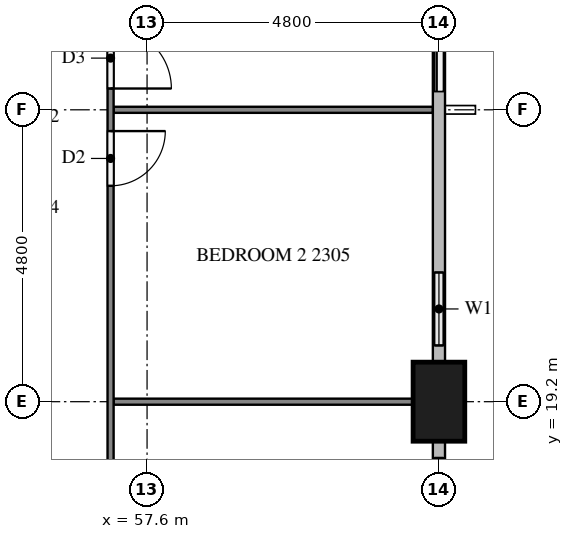
"""IFC4 building model, lengths in metres.
Left out: names, types, materials, properties, quantities, classifications, styles, units other than length and angle.
Written with IfcOpenShell. Run it as: python <this file> out.ifc"""

import sys

from ifc_helpers import new_model, si_unit, direction, frame, frame_2d, origin, origin_2d, place, context, subcontext, project, spatial, rectangle, extrude, element, fill, save


model = new_model("IFC4")
c1 = context("Model", 3, precision=1e-05, world=origin(), true_north=direction((0.0, 1.0)))
c2 = subcontext(c1, "Body", "Model", "MODEL_VIEW")
j1 = project(units=[si_unit("LENGTHUNIT", "METRE"), si_unit("PLANEANGLEUNIT", "RADIAN")], contexts=[c1])
p1 = place(None, origin())
s1 = spatial("IfcSite", under=j1, at=p1, CompositionType="ELEMENT")
p2 = place(p1, origin())
s2 = spatial("IfcBuilding", under=s1, at=p2, CompositionType="ELEMENT")
p3 = place(p2, frame((0.0, 0.0, 92.7)))
s3 = spatial("IfcBuildingStorey", under=s2, at=p3, CompositionType="ELEMENT", Elevation=92.7)
p4 = place(p3, frame((62.4, 19.2, 0.0), z_axis=(0.0, 0.0, 1.0), x_axis=(0.0, 1.0, 0.0)))
e1 = element("IfcColumn", 1, at=p4, inside=s3, PredefinedType="COLUMN", context=c2, shape_type="SweptSolid", body=[
    extrude(rectangle(XDim=1.3, YDim=0.85, at=origin_2d()), origin(), (0.0, 0.0, 1.0), 3.2),
])
p5 = place(p3, frame((62.4, 16.8, 0.0), z_axis=(0.0, 0.0, 1.0), x_axis=(0.0, 1.0, 0.0)))
e2 = element("IfcWall", 2, at=p5, inside=s3, PredefinedType="SOLIDWALL", context=c2, shape_type="SweptSolid", body=[
    extrude(rectangle(XDim=1.75, YDim=0.15, at=frame_2d((0.875, 0.0))), origin(), (0.0, 0.0, 1.0), 3.2),
])
p6 = place(p5, frame((0.275, 0.0, 0.9)))
e3 = element("IfcOpeningElement", 3, at=p6, cuts=e2, PredefinedType="OPENING", context=c2, shape_type="SweptSolid", body=[
    extrude(rectangle(XDim=1.2, YDim=1.4, at=frame_2d((0.6, 0.7))), frame((0.0, 0.085, 0.0), z_axis=(0.0, -1.0, 0.0), x_axis=(1.0, 0.0, 0.0)), (0.0, 0.0, 1.0), 0.17),
])
p7 = place(p3, frame((62.4, 19.85, 0.0), z_axis=(0.0, 0.0, 1.0), x_axis=(0.0, 1.0, 0.0)))
e4 = element("IfcWall", 4, at=p7, inside=s3, PredefinedType="SOLIDWALL", context=c2, shape_type="SweptSolid", body=[
    extrude(rectangle(XDim=1.75, YDim=0.15, at=frame_2d((0.875, 0.0))), origin(), (0.0, 0.0, 1.0), 3.2),
])
p8 = place(p7, frame((0.275, 0.0, 0.9)))
e5 = element("IfcOpeningElement", 5, at=p8, cuts=e4, PredefinedType="OPENING", context=c2, shape_type="SweptSolid", body=[
    extrude(rectangle(XDim=1.2, YDim=1.4, at=frame_2d((0.6, 0.7))), frame((0.0, 0.085, 0.0), z_axis=(0.0, -1.0, 0.0), x_axis=(1.0, 0.0, 0.0)), (0.0, 0.0, 1.0), 0.17),
])
p9 = place(p3, frame((62.4, 24.0, 0.0), z_axis=(0.0, 0.0, 1.0), x_axis=(0.0, 1.0, 0.0)))
e6 = element("IfcWall", 6, at=p9, inside=s3, PredefinedType="SOLIDWALL", context=c2, shape_type="SweptSolid", body=[
    extrude(rectangle(XDim=2.4, YDim=0.15, at=frame_2d((1.2, 0.0))), origin(), (0.0, 0.0, 1.0), 3.2),
])
p10 = place(p9, frame((0.3, 0.0, 0.0)))
e7 = element("IfcOpeningElement", 7, at=p10, cuts=e6, PredefinedType="OPENING", context=c2, shape_type="SweptSolid", body=[
    extrude(rectangle(XDim=1.8, YDim=2.4, at=frame_2d((0.9, 1.2))), frame((0.0, 0.085, 0.0), z_axis=(0.0, -1.0, 0.0), x_axis=(1.0, 0.0, 0.0)), (0.0, 0.0, 1.0), 0.17),
])
p11 = place(p3, frame((57.05, 19.2, 0.0), z_axis=(0.0, 0.0, 1.0), x_axis=(1.0, 0.0, 0.0)))
e8 = element("IfcWall", 8, at=p11, inside=s3, PredefinedType="PARTITIONING", context=c2, shape_type="SweptSolid", body=[
    extrude(rectangle(XDim=4.925, YDim=0.1, at=frame_2d((2.462, 0.0))), origin(), (0.0, 0.0, 1.0), 3.2),
])
p12 = place(p3, frame((57.05, 24.0, 0.0), z_axis=(0.0, 0.0, 1.0), x_axis=(1.0, 0.0, 0.0)))
e9 = element("IfcWall", 9, at=p12, inside=s3, PredefinedType="PARTITIONING", context=c2, shape_type="SweptSolid", body=[
    extrude(rectangle(XDim=5.25, YDim=0.1, at=frame_2d((2.625, 0.0))), origin(), (0.0, 0.0, 1.0), 3.2),
])
p13 = place(p3, frame((57.0, 28.7, 0.0), z_axis=(0.0, 0.0, 1.0), x_axis=(0.0, -1.0, 0.0)))
e10 = element("IfcWall", 10, at=p13, inside=s3, PredefinedType="PARTITIONING", context=c2, shape_type="SweptSolid", body=[
    extrude(rectangle(XDim=13.6, YDim=0.1, at=frame_2d((6.8, 0.0))), origin(), (0.0, 0.0, 1.0), 3.2),
])
p14 = place(p13, frame((12.4, 0.0, 0.0)))
e11 = element("IfcOpeningElement", 11, at=p14, cuts=e10, PredefinedType="OPENING", context=c2, shape_type="SweptSolid", body=[
    extrude(rectangle(XDim=0.9, YDim=2.1, at=frame_2d((0.45, 1.05))), frame((0.0, 0.06, 0.0), z_axis=(0.0, -1.0, 0.0), x_axis=(1.0, 0.0, 0.0)), (0.0, 0.0, 1.0), 0.12),
])
p15 = place(p13, frame((5.05, 0.0, 0.0)))
e12 = element("IfcOpeningElement", 12, at=p15, cuts=e10, PredefinedType="OPENING", context=c2, shape_type="SweptSolid", body=[
    extrude(rectangle(XDim=0.9, YDim=2.1, at=frame_2d((0.45, 1.05))), frame((0.0, 0.06, 0.0), z_axis=(0.0, -1.0, 0.0), x_axis=(1.0, 0.0, 0.0)), (0.0, 0.0, 1.0), 0.12),
])
p16 = place(p13, frame((3.35, 0.0, 0.0)))
e13 = element("IfcOpeningElement", 13, at=p16, cuts=e10, PredefinedType="OPENING", context=c2, shape_type="SweptSolid", body=[
    extrude(rectangle(XDim=1.0, YDim=2.1, at=frame_2d((0.5, 1.05))), frame((0.0, 0.06, 0.0), z_axis=(0.0, -1.0, 0.0), x_axis=(1.0, 0.0, 0.0)), (0.0, 0.0, 1.0), 0.12),
])
p17 = place(p6, origin())
e14 = element("IfcWindow", 14, at=p17, inside=s3, PartitioningType="SINGLE_PANEL", PredefinedType="WINDOW", context=c2, shape_type="SweptSolid", body=[
    extrude(rectangle(XDim=1.2, YDim=1.4, at=frame_2d((0.6, 0.7))), frame((0.0, 0.03, 0.0), z_axis=(0.0, -1.0, 0.0), x_axis=(1.0, 0.0, 0.0)), (0.0, 0.0, 1.0), 0.06),
])
fill(e3, e14)
p18 = place(p8, origin())
e15 = element("IfcWindow", 15, at=p18, inside=s3, PartitioningType="SINGLE_PANEL", PredefinedType="WINDOW", context=c2, shape_type="SweptSolid", body=[
    extrude(rectangle(XDim=1.2, YDim=1.4, at=frame_2d((0.6, 0.7))), frame((0.0, 0.03, 0.0), z_axis=(0.0, -1.0, 0.0), x_axis=(1.0, 0.0, 0.0)), (0.0, 0.0, 1.0), 0.06),
])
fill(e5, e15)
p19 = place(p10, origin())
e16 = element("IfcDoor", 16, at=p19, inside=s3, OperationType="SLIDING_TO_RIGHT", PredefinedType="DOOR", context=c2, shape_type="SweptSolid", body=[
    extrude(rectangle(XDim=1.8, YDim=2.4, at=frame_2d((0.9, 1.2))), frame((0.0, 0.025, 0.0), z_axis=(0.0, -1.0, 0.0), x_axis=(1.0, 0.0, 0.0)), (0.0, 0.0, 1.0), 0.05),
])
fill(e7, e16)
p20 = place(p15, origin())
e17 = element("IfcDoor", 17, at=p20, inside=s3, OperationType="SINGLE_SWING_LEFT", PredefinedType="DOOR", context=c2, shape_type="SweptSolid", body=[
    extrude(rectangle(XDim=0.9, YDim=2.1, at=frame_2d((0.45, 1.05))), frame((0.0, 0.025, 0.0), z_axis=(0.0, -1.0, 0.0), x_axis=(1.0, 0.0, 0.0)), (0.0, 0.0, 1.0), 0.05),
])
fill(e12, e17)
p21 = place(p16, origin())
e18 = element("IfcDoor", 18, at=p21, inside=s3, OperationType="SINGLE_SWING_RIGHT", PredefinedType="DOOR", context=c2, shape_type="SweptSolid", body=[
    extrude(rectangle(XDim=1.0, YDim=2.1, at=frame_2d((0.5, 1.05))), frame((0.0, 0.025, 0.0), z_axis=(0.0, -1.0, 0.0), x_axis=(1.0, 0.0, 0.0)), (0.0, 0.0, 1.0), 0.05),
])
fill(e13, e18)
save(model, sys.argv[1])
